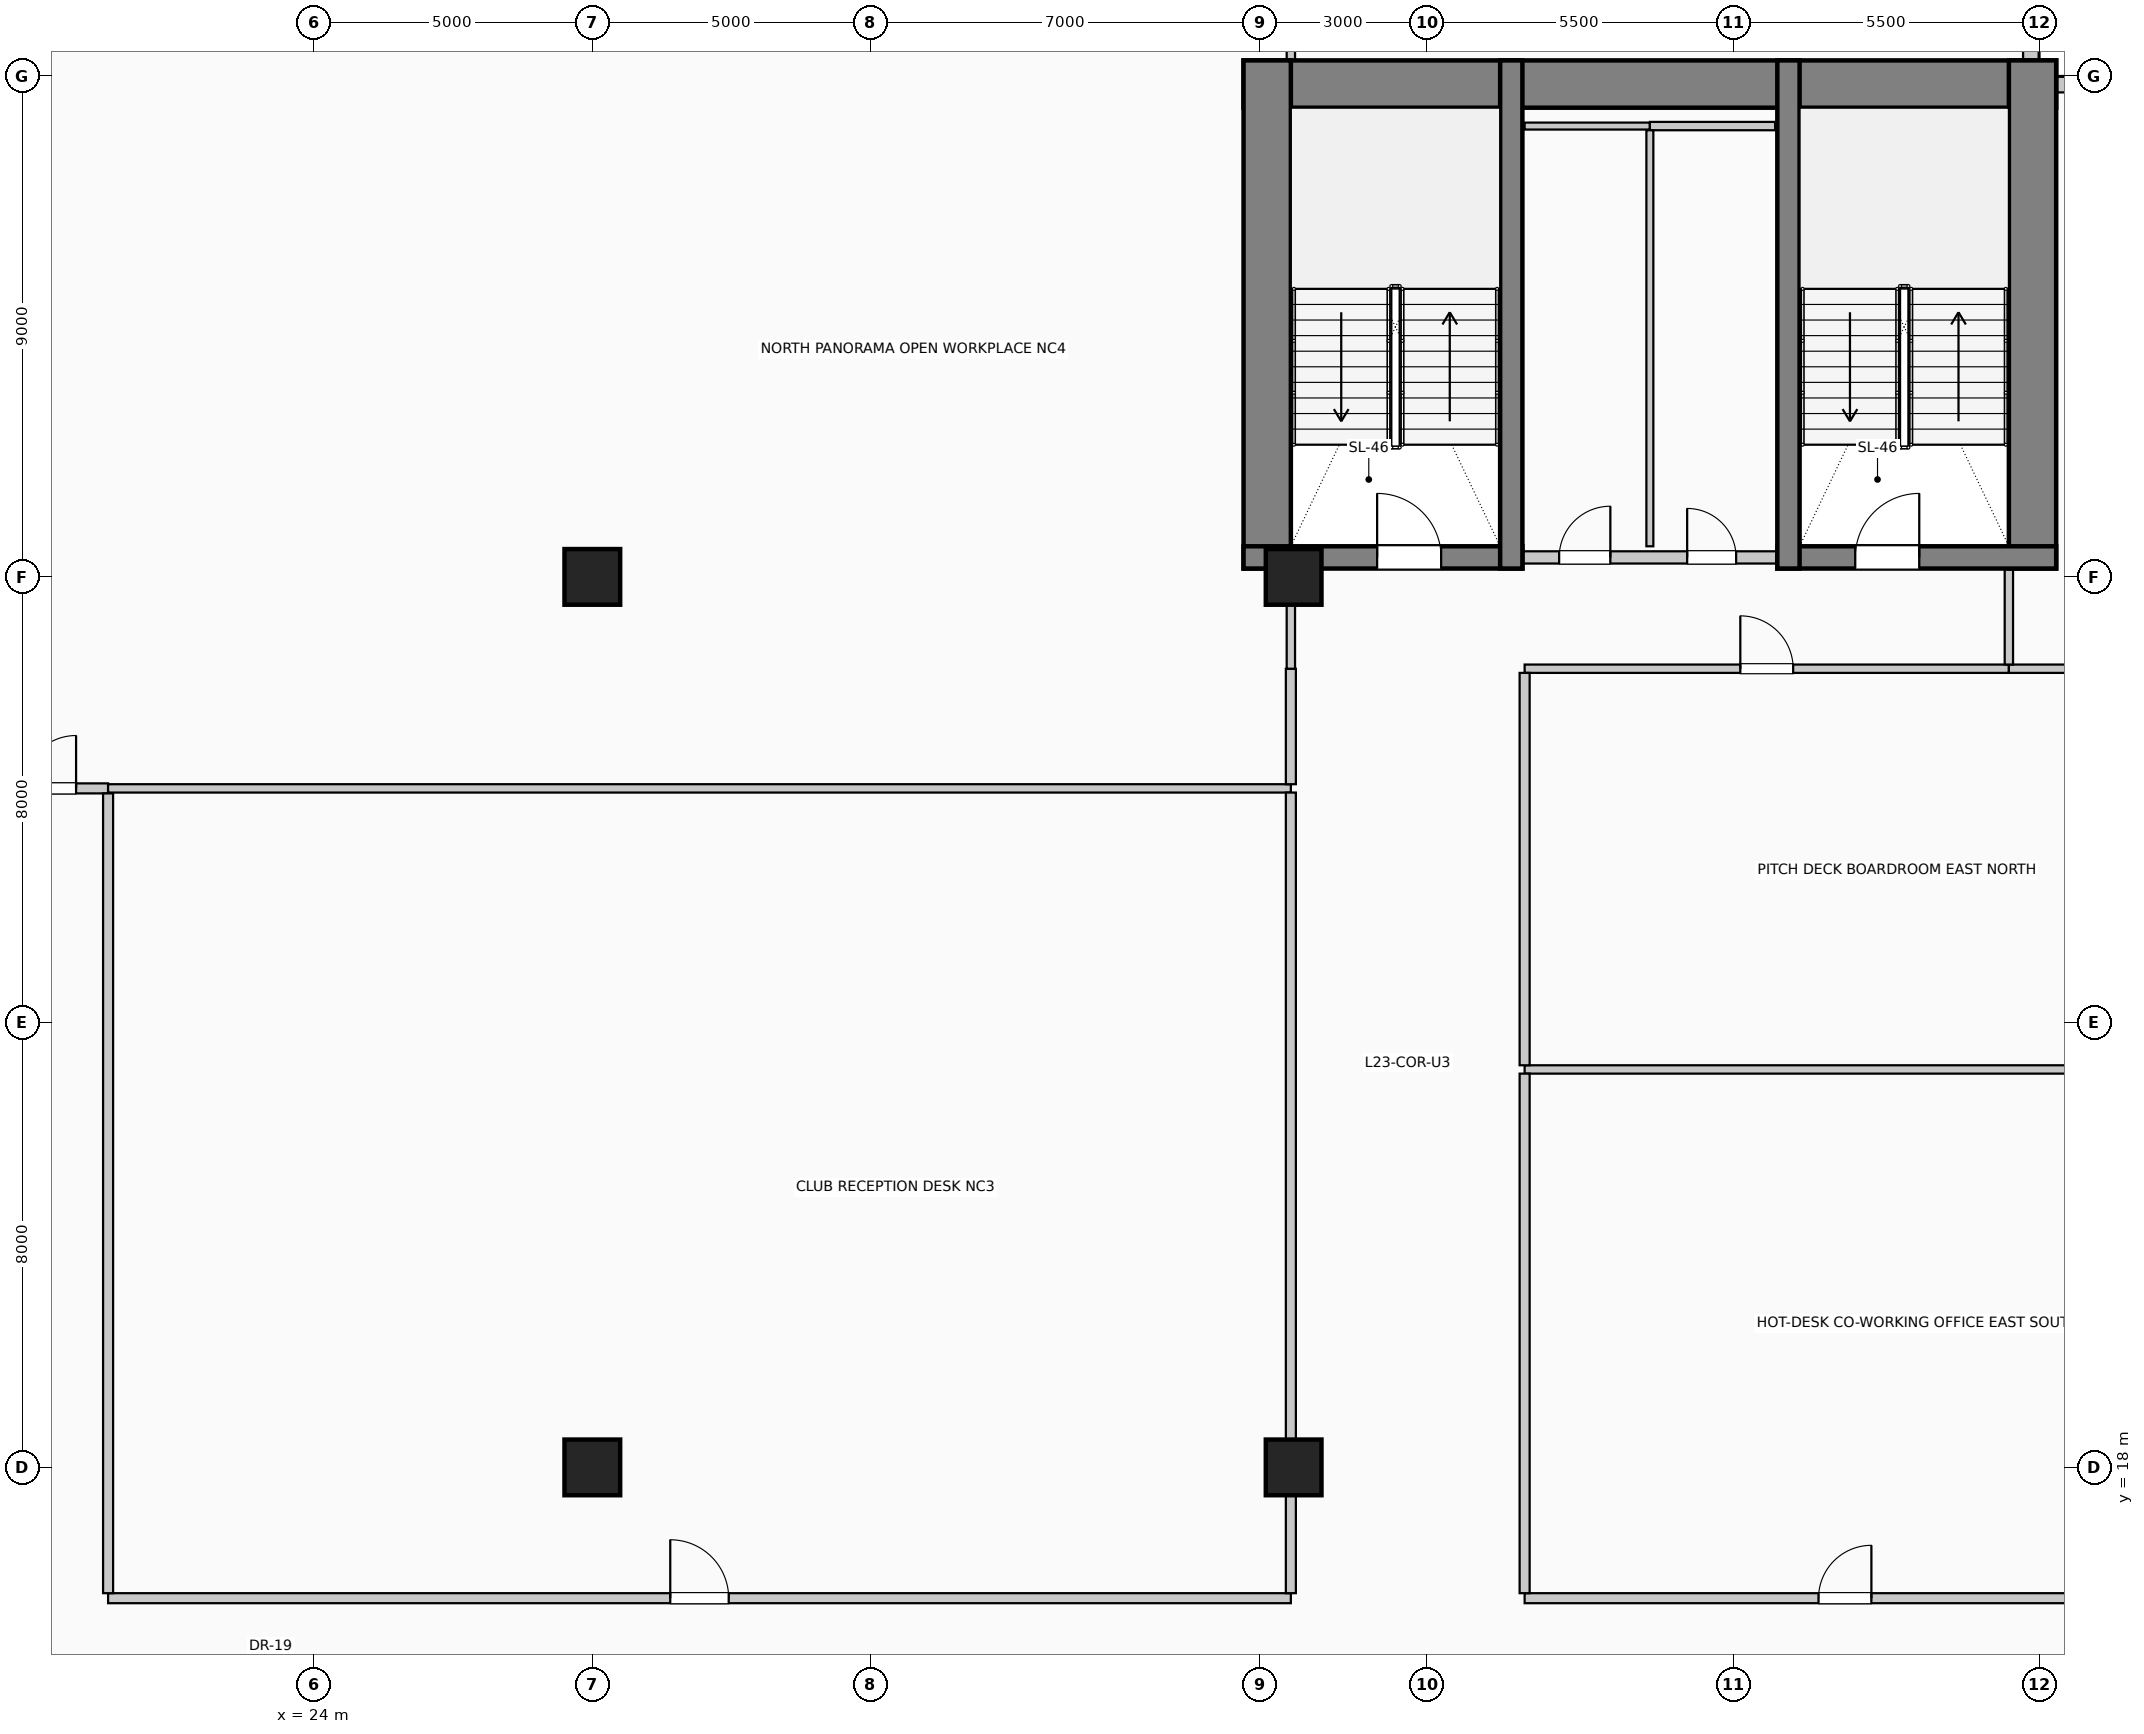
"""IFC4 building model, lengths in metres.
Left out: names, types, materials, properties, quantities, classifications, styles, units other than length and angle.
Written with IfcOpenShell. Run it as: python <this file> out.ifc"""

import sys

from ifc_helpers import new_model, si_unit, direction, frame, frame_2d, origin, origin_2d, place, context, subcontext, project, spatial, rectangle, circle, extrude, element, fill, save


model = new_model("IFC4")
c1 = context("Model", 3, precision=1e-05, world=origin(), true_north=direction((0.0, 1.0)))
c2 = subcontext(c1, "Body", "Model", "MODEL_VIEW")
j1 = project(units=[si_unit("LENGTHUNIT", "METRE"), si_unit("PLANEANGLEUNIT", "RADIAN")], contexts=[c1])
p1 = place(None, origin())
s1 = spatial("IfcSite", under=j1, at=p1, CompositionType="ELEMENT")
p2 = place(p1, origin())
s2 = spatial("IfcBuilding", under=s1, at=p2, CompositionType="ELEMENT")
p3 = place(p2, frame((0.0, 0.0, 96.6)))
s3 = spatial("IfcBuildingStorey", under=s2, at=p3, CompositionType="ELEMENT", Elevation=96.6)
p4 = place(p3, frame((40.7, 42.855, 0.0), z_axis=(0.0, 0.0, 1.0), x_axis=(1.0, 0.0, 0.0)))
e1 = element("IfcWall", 1, at=p4, inside=s3, PredefinedType="SHEAR", context=c2, shape_type="SweptSolid", body=[
    extrude(rectangle(XDim=14.6, YDim=0.85, at=frame_2d((7.3, 0.0))), origin(), (0.0, 0.0, 1.0), 4.0),
])
for number, where, z_axis, x_axis in (
    (2, (41.125, 34.15, 0.0), (0.0, 0.0, 1.0), (0.0, 1.0, 0.0)),
    (3, (54.875, 34.15, 0.0), (0.0, 0.0, 1.0), (0.0, 1.0, 0.0)),
):
    element("IfcWall", number, at=place(p3, frame(where, z_axis=z_axis, x_axis=x_axis)), inside=s3, PredefinedType="SHEAR", context=c2, shape_type="SweptSolid", body=[
        extrude(rectangle(XDim=9.13, YDim=0.85, at=frame_2d((4.565, 0.0))), origin(), (0.0, 0.0, 1.0), 4.0),
    ])
p5 = place(p3, frame((40.7, 34.35, 0.0), z_axis=(0.0, 0.0, 1.0), x_axis=(1.0, 0.0, 0.0)))
e4 = element("IfcWall", 4, at=p5, inside=s3, PredefinedType="SHEAR", context=c2, shape_type="SweptSolid", body=[
    extrude(rectangle(XDim=5.01, YDim=0.4, at=frame_2d((2.505, 0.0))), origin(), (0.0, 0.0, 1.0), 4.0),
])
p6 = place(p5, frame((2.4, 0.0, 0.0)))
e5 = element("IfcOpeningElement", 5, at=p6, cuts=e4, PredefinedType="OPENING", context=c2, shape_type="SweptSolid", body=[
    extrude(rectangle(XDim=1.15, YDim=2.2, at=frame_2d((0.575, 1.1))), frame((0.0, 0.21, 0.0), z_axis=(0.0, -1.0, 0.0), x_axis=(1.0, 0.0, 0.0)), (0.0, 0.0, 1.0), 0.42),
])
p7 = place(p3, frame((45.51, 34.15, 0.0), z_axis=(0.0, 0.0, 1.0), x_axis=(0.0, 1.0, 0.0)))
e6 = element("IfcWall", 6, at=p7, inside=s3, PredefinedType="SHEAR", context=c2, shape_type="SweptSolid", body=[
    extrude(rectangle(XDim=9.13, YDim=0.4, at=frame_2d((4.565, 0.0))), origin(), (0.0, 0.0, 1.0), 4.0),
])
p8 = place(p3, frame((50.29, 34.35, 0.0), z_axis=(0.0, 0.0, 1.0), x_axis=(1.0, 0.0, 0.0)))
e7 = element("IfcWall", 7, at=p8, inside=s3, PredefinedType="SHEAR", context=c2, shape_type="SweptSolid", body=[
    extrude(rectangle(XDim=5.01, YDim=0.4, at=frame_2d((2.505, 0.0))), origin(), (0.0, 0.0, 1.0), 4.0),
])
p9 = place(p8, frame((1.4, 0.0, 0.0)))
e8 = element("IfcOpeningElement", 8, at=p9, cuts=e7, PredefinedType="OPENING", context=c2, shape_type="SweptSolid", body=[
    extrude(rectangle(XDim=1.15, YDim=2.2, at=frame_2d((0.575, 1.1))), frame((0.0, 0.21, 0.0), z_axis=(0.0, -1.0, 0.0), x_axis=(1.0, 0.0, 0.0)), (0.0, 0.0, 1.0), 0.42),
])
p10 = place(p3, frame((50.49, 34.15, 0.0), z_axis=(0.0, 0.0, 1.0), x_axis=(0.0, 1.0, 0.0)))
e9 = element("IfcWall", 9, at=p10, inside=s3, PredefinedType="SHEAR", context=c2, shape_type="SweptSolid", body=[
    extrude(rectangle(XDim=9.13, YDim=0.4, at=frame_2d((4.565, 0.0))), origin(), (0.0, 0.0, 1.0), 4.0),
])
for number, where, z_axis, x_axis in (
    (10, (29.0, 18.0, 0.0), (0.0, 0.0, 1.0), (1.0, 0.0, 0.0)),
    (11, (29.0, 34.0, 0.0), (0.0, 0.0, 1.0), (1.0, 0.0, 0.0)),
    (12, (41.6, 18.0, 0.0), (0.0, 0.0, 1.0), (1.0, 0.0, 0.0)),
    (13, (41.6, 34.0, 0.0), (0.0, 0.0, 1.0), (1.0, 0.0, 0.0)),
):
    element("IfcColumn", number, at=place(p3, frame(where, z_axis=z_axis, x_axis=x_axis)), inside=s3, PredefinedType="COLUMN", context=c2, shape_type="SweptSolid", body=[
        extrude(circle(Radius=0.5, at=origin_2d()), origin(), (0.0, 0.0, 1.0), 4.0),
    ])
p11 = place(p3, frame((54.845, 45.4, 0.0), z_axis=(0.0, 0.0, 1.0), x_axis=(0.0, -1.0, 0.0)))
e14 = element("IfcWall", 14, at=p11, inside=s3, PredefinedType="SOLIDWALL", context=c2, shape_type="SweptSolid", body=[
    extrude(rectangle(XDim=2.115, YDim=0.28, at=frame_2d((1.058, 0.0))), origin(), (0.0, 0.0, 1.0), 3.725),
])
p12 = place(p3, frame((55.305, 42.845, 0.0), z_axis=(0.0, 0.0, 1.0), x_axis=(1.0, 0.0, 0.0)))
e15 = element("IfcWall", 15, at=p12, inside=s3, PredefinedType="SOLIDWALL", context=c2, shape_type="SweptSolid", body=[
    extrude(rectangle(XDim=2.095, YDim=0.28, at=frame_2d((1.047, 0.0))), origin(), (0.0, 0.0, 1.0), 3.725),
])
p13 = place(p3, frame((45.72, 34.35, 0.0), z_axis=(0.0, 0.0, 1.0), x_axis=(1.0, 0.0, 0.0)))
e16 = element("IfcWall", 16, at=p13, inside=s3, PredefinedType="PARTITIONING", context=c2, shape_type="SweptSolid", body=[
    extrude(rectangle(XDim=4.56, YDim=0.22, at=frame_2d((2.28, 0.0))), origin(), (0.0, 0.0, 1.0), 3.725),
])
p14 = place(p13, frame((0.65, 0.0, 0.0)))
e17 = element("IfcOpeningElement", 17, at=p14, cuts=e16, PredefinedType="OPENING", context=c2, shape_type="SweptSolid", body=[
    extrude(rectangle(XDim=0.92, YDim=2.1, at=frame_2d((0.46, 1.05))), frame((0.0, 0.12, 0.0), z_axis=(0.0, -1.0, 0.0), x_axis=(1.0, 0.0, 0.0)), (0.0, 0.0, 1.0), 0.24),
])
p15 = place(p13, frame((2.95, 0.0, 0.0)))
e18 = element("IfcOpeningElement", 18, at=p15, cuts=e16, PredefinedType="OPENING", context=c2, shape_type="SweptSolid", body=[
    extrude(rectangle(XDim=0.88, YDim=2.1, at=frame_2d((0.44, 1.05))), frame((0.0, 0.12, 0.0), z_axis=(0.0, -1.0, 0.0), x_axis=(1.0, 0.0, 0.0)), (0.0, 0.0, 1.0), 0.24),
])
p16 = place(p3, frame((20.3, 15.65, 0.0), z_axis=(0.0, 0.0, 1.0), x_axis=(1.0, 0.0, 0.0)))
e19 = element("IfcWall", 19, at=p16, inside=s3, PredefinedType="PARTITIONING", context=c2, shape_type="SweptSolid", body=[
    extrude(rectangle(XDim=21.25, YDim=0.18, at=frame_2d((10.625, 0.0))), origin(), (0.0, 0.0, 1.0), 3.725),
])
p17 = place(p16, frame((10.1, 0.0, 0.0)))
e20 = element("IfcOpeningElement", 20, at=p17, cuts=e19, PredefinedType="OPENING", context=c2, shape_type="SweptSolid", body=[
    extrude(rectangle(XDim=1.05, YDim=2.15, at=frame_2d((0.525, 1.075))), frame((0.0, 0.1, 0.0), z_axis=(0.0, -1.0, 0.0), x_axis=(1.0, 0.0, 0.0)), (0.0, 0.0, 1.0), 0.2),
])
p18 = place(p3, frame((45.75, 15.65, 0.0), z_axis=(0.0, 0.0, 1.0), x_axis=(1.0, 0.0, 0.0)))
e21 = element("IfcWall", 21, at=p18, inside=s3, PredefinedType="PARTITIONING", context=c2, shape_type="SweptSolid", body=[
    extrude(rectangle(XDim=11.51, YDim=0.18, at=frame_2d((5.755, 0.0))), origin(), (0.0, 0.0, 1.0), 3.725),
])
p19 = place(p18, frame((5.28, 0.0, 0.0)))
e22 = element("IfcOpeningElement", 22, at=p19, cuts=e21, PredefinedType="OPENING", context=c2, shape_type="SweptSolid", body=[
    extrude(rectangle(XDim=0.95, YDim=2.15, at=frame_2d((0.475, 1.075))), frame((0.0, 0.1, 0.0), z_axis=(0.0, -1.0, 0.0), x_axis=(1.0, 0.0, 0.0)), (0.0, 0.0, 1.0), 0.2),
])
p20 = place(p3, frame((45.75, 25.15, 0.0), z_axis=(0.0, 0.0, 1.0), x_axis=(1.0, 0.0, 0.0)))
e23 = element("IfcWall", 23, at=p20, inside=s3, PredefinedType="PARTITIONING", context=c2, shape_type="SweptSolid", body=[
    extrude(rectangle(XDim=11.51, YDim=0.15, at=frame_2d((5.755, 0.0))), origin(), (0.0, 0.0, 1.0), 3.17),
])
p21 = place(p3, frame((18.2, 30.2, 0.0), z_axis=(0.0, 0.0, 1.0), x_axis=(1.0, 0.0, 0.0)))
e24 = element("IfcWall", 24, at=p21, inside=s3, PredefinedType="PARTITIONING", context=c2, shape_type="SweptSolid", body=[
    extrude(rectangle(XDim=2.1, YDim=0.18, at=frame_2d((1.05, 0.0))), origin(), (0.0, 0.0, 1.0), 3.725),
])
p22 = place(p21, frame((0.575, 0.0, 0.0)))
e25 = element("IfcOpeningElement", 25, at=p22, cuts=e24, PredefinedType="OPENING", context=c2, shape_type="SweptSolid", body=[
    extrude(rectangle(XDim=0.95, YDim=2.15, at=frame_2d((0.475, 1.075))), frame((0.0, 0.1, 0.0), z_axis=(0.0, -1.0, 0.0), x_axis=(1.0, 0.0, 0.0)), (0.0, 0.0, 1.0), 0.2),
])
p23 = place(p3, frame((20.3, 30.2, 0.0), z_axis=(0.0, 0.0, 1.0), x_axis=(1.0, 0.0, 0.0)))
e26 = element("IfcWall", 26, at=p23, inside=s3, PredefinedType="PARTITIONING", context=c2, shape_type="SweptSolid", body=[
    extrude(rectangle(XDim=21.25, YDim=0.15, at=frame_2d((10.625, 0.0))), origin(), (0.0, 0.0, 1.0), 3.725),
])
p24 = place(p3, frame((45.75, 32.35, 0.0), z_axis=(0.0, 0.0, 1.0), x_axis=(1.0, 0.0, 0.0)))
e27 = element("IfcWall", 27, at=p24, inside=s3, PredefinedType="PARTITIONING", context=c2, shape_type="SweptSolid", body=[
    extrude(rectangle(XDim=8.7, YDim=0.15, at=frame_2d((4.35, 0.0))), origin(), (0.0, 0.0, 1.0), 3.725),
])
p25 = place(p24, frame((3.875, 0.0, 0.0)))
e28 = element("IfcOpeningElement", 28, at=p25, cuts=e27, PredefinedType="OPENING", context=c2, shape_type="SweptSolid", body=[
    extrude(rectangle(XDim=0.95, YDim=2.15, at=frame_2d((0.475, 1.075))), frame((0.0, 0.085, 0.0), z_axis=(0.0, -1.0, 0.0), x_axis=(1.0, 0.0, 0.0)), (0.0, 0.0, 1.0), 0.17),
])
p26 = place(p3, frame((54.45, 32.35, 0.0), z_axis=(0.0, 0.0, 1.0), x_axis=(1.0, 0.0, 0.0)))
e29 = element("IfcWall", 29, at=p26, inside=s3, PredefinedType="PARTITIONING", context=c2, shape_type="SweptSolid", body=[
    extrude(rectangle(XDim=2.81, YDim=0.15, at=frame_2d((1.405, 0.0))), origin(), (0.0, 0.0, 1.0), 3.725),
])
p27 = place(p3, frame((45.75, 42.1, 0.0), z_axis=(0.0, 0.0, 1.0), x_axis=(1.0, 0.0, 0.0)))
e30 = element("IfcWall", 30, at=p27, inside=s3, PredefinedType="PARTITIONING", context=c2, shape_type="SweptSolid", body=[
    extrude(rectangle(XDim=2.25, YDim=0.125, at=frame_2d((1.125, 0.0))), origin(), (0.0, 0.0, 1.0), 3.725),
])
p28 = place(p3, frame((48.0, 42.1, 0.0), z_axis=(0.0, 0.0, 1.0), x_axis=(1.0, 0.0, 0.0)))
e31 = element("IfcWall", 31, at=p28, inside=s3, PredefinedType="PARTITIONING", context=c2, shape_type="SweptSolid", body=[
    extrude(rectangle(XDim=2.25, YDim=0.15, at=frame_2d((1.125, 0.0))), origin(), (0.0, 0.0, 1.0), 3.725),
])
p29 = place(p3, frame((20.3, 15.74, 0.0), z_axis=(0.0, 0.0, 1.0), x_axis=(0.0, 1.0, 0.0)))
e32 = element("IfcWall", 32, at=p29, inside=s3, PredefinedType="PARTITIONING", context=c2, shape_type="SweptSolid", body=[
    extrude(rectangle(XDim=14.37, YDim=0.18, at=frame_2d((7.185, 0.0))), origin(), (0.0, 0.0, 1.0), 3.725),
])
p30 = place(p3, frame((41.55, 15.74, 0.0), z_axis=(0.0, 0.0, 1.0), x_axis=(0.0, 1.0, 0.0)))
e33 = element("IfcWall", 33, at=p30, inside=s3, PredefinedType="PARTITIONING", context=c2, shape_type="SweptSolid", body=[
    extrude(rectangle(XDim=1.76, YDim=0.18, at=frame_2d((0.88, 0.0))), origin(), (0.0, 0.0, 1.0), 3.07),
])
p31 = place(p3, frame((41.55, 18.5, 0.0), z_axis=(0.0, 0.0, 1.0), x_axis=(0.0, 1.0, 0.0)))
e34 = element("IfcWall", 34, at=p31, inside=s3, PredefinedType="PARTITIONING", context=c2, shape_type="SweptSolid", body=[
    extrude(rectangle(XDim=11.625, YDim=0.18, at=frame_2d((5.812, 0.0))), origin(), (0.0, 0.0, 1.0), 3.07),
])
p32 = place(p3, frame((41.55, 30.275, 0.0), z_axis=(0.0, 0.0, 1.0), x_axis=(0.0, 1.0, 0.0)))
e35 = element("IfcWall", 35, at=p32, inside=s3, PredefinedType="PARTITIONING", context=c2, shape_type="SweptSolid", body=[
    extrude(rectangle(XDim=2.075, YDim=0.18, at=frame_2d((1.038, 0.0))), origin(), (0.0, 0.0, 1.0), 3.07),
])
p33 = place(p3, frame((41.55, 32.35, 0.0), z_axis=(0.0, 0.0, 1.0), x_axis=(0.0, 1.0, 0.0)))
e36 = element("IfcWall", 36, at=p33, inside=s3, PredefinedType="PARTITIONING", context=c2, shape_type="SweptSolid", body=[
    extrude(rectangle(XDim=1.15, YDim=0.15, at=frame_2d((0.575, 0.0))), origin(), (0.0, 0.0, 1.0), 3.07),
])
p34 = place(p3, frame((41.55, 43.28, 0.0), z_axis=(0.0, 0.0, 1.0), x_axis=(0.0, 1.0, 0.0)))
e37 = element("IfcWall", 37, at=p34, inside=s3, PredefinedType="PARTITIONING", context=c2, shape_type="SweptSolid", body=[
    extrude(rectangle(XDim=1.42, YDim=0.15, at=frame_2d((0.71, 0.0))), origin(), (0.0, 0.0, 1.0), 3.725),
])
p35 = place(p3, frame((45.75, 15.74, 0.0), z_axis=(0.0, 0.0, 1.0), x_axis=(0.0, 1.0, 0.0)))
e38 = element("IfcWall", 38, at=p35, inside=s3, PredefinedType="PARTITIONING", context=c2, shape_type="SweptSolid", body=[
    extrude(rectangle(XDim=9.335, YDim=0.18, at=frame_2d((4.667, 0.0))), origin(), (0.0, 0.0, 1.0), 3.725),
])
p36 = place(p3, frame((45.75, 25.225, 0.0), z_axis=(0.0, 0.0, 1.0), x_axis=(0.0, 1.0, 0.0)))
e39 = element("IfcWall", 39, at=p36, inside=s3, PredefinedType="PARTITIONING", context=c2, shape_type="SweptSolid", body=[
    extrude(rectangle(XDim=7.05, YDim=0.18, at=frame_2d((3.525, 0.0))), origin(), (0.0, 0.0, 1.0), 3.725),
])
p37 = place(p3, frame((48.0, 34.55, 0.0), z_axis=(0.0, 0.0, 1.0), x_axis=(0.0, 1.0, 0.0)))
e40 = element("IfcWall", 40, at=p37, inside=s3, PredefinedType="PARTITIONING", context=c2, shape_type="SweptSolid", body=[
    extrude(rectangle(XDim=7.475, YDim=0.125, at=frame_2d((3.737, 0.0))), origin(), (0.0, 0.0, 1.0), 3.725),
])
p38 = place(p3, frame((54.45, 32.425, 0.0), z_axis=(0.0, 0.0, 1.0), x_axis=(0.0, 1.0, 0.0)))
e41 = element("IfcWall", 41, at=p38, inside=s3, PredefinedType="PARTITIONING", context=c2, shape_type="SweptSolid", body=[
    extrude(rectangle(XDim=1.725, YDim=0.15, at=frame_2d((0.862, 0.0))), origin(), (0.0, 0.0, 1.0), 3.725),
])
p39 = place(p6, origin())
e42 = element("IfcDoor", 42, at=p39, inside=s3, OperationType="SINGLE_SWING_LEFT", PredefinedType="DOOR", context=c2, shape_type="SweptSolid", body=[
    extrude(rectangle(XDim=1.15, YDim=2.2, at=frame_2d((0.575, 1.1))), frame((0.0, 0.025, 0.0), z_axis=(0.0, -1.0, 0.0), x_axis=(1.0, 0.0, 0.0)), (0.0, 0.0, 1.0), 0.05),
])
fill(e5, e42)
p40 = place(p14, origin())
e43 = element("IfcDoor", 43, at=p40, inside=s3, OperationType="SINGLE_SWING_RIGHT", PredefinedType="DOOR", context=c2, shape_type="SweptSolid", body=[
    extrude(rectangle(XDim=0.92, YDim=2.1, at=frame_2d((0.46, 1.05))), frame((0.0, 0.025, 0.0), z_axis=(0.0, -1.0, 0.0), x_axis=(1.0, 0.0, 0.0)), (0.0, 0.0, 1.0), 0.05),
])
fill(e17, e43)
p41 = place(p15, origin())
e44 = element("IfcDoor", 44, at=p41, inside=s3, OperationType="SINGLE_SWING_LEFT", PredefinedType="DOOR", context=c2, shape_type="SweptSolid", body=[
    extrude(rectangle(XDim=0.88, YDim=2.1, at=frame_2d((0.44, 1.05))), frame((0.0, 0.025, 0.0), z_axis=(0.0, -1.0, 0.0), x_axis=(1.0, 0.0, 0.0)), (0.0, 0.0, 1.0), 0.05),
])
fill(e18, e44)
p42 = place(p9, origin())
e45 = element("IfcDoor", 45, at=p42, inside=s3, OperationType="SINGLE_SWING_RIGHT", PredefinedType="DOOR", context=c2, shape_type="SweptSolid", body=[
    extrude(rectangle(XDim=1.15, YDim=2.2, at=frame_2d((0.575, 1.1))), frame((0.0, 0.025, 0.0), z_axis=(0.0, -1.0, 0.0), x_axis=(1.0, 0.0, 0.0)), (0.0, 0.0, 1.0), 0.05),
])
fill(e8, e45)
p43 = place(p17, origin())
e46 = element("IfcDoor", 46, at=p43, inside=s3, OperationType="SINGLE_SWING_LEFT", PredefinedType="DOOR", context=c2, shape_type="SweptSolid", body=[
    extrude(rectangle(XDim=1.05, YDim=2.15, at=frame_2d((0.525, 1.075))), frame((0.0, 0.025, 0.0), z_axis=(0.0, -1.0, 0.0), x_axis=(1.0, 0.0, 0.0)), (0.0, 0.0, 1.0), 0.05),
])
fill(e20, e46)
p44 = place(p19, origin())
e47 = element("IfcDoor", 47, at=p44, inside=s3, OperationType="SINGLE_SWING_RIGHT", PredefinedType="DOOR", context=c2, shape_type="SweptSolid", body=[
    extrude(rectangle(XDim=0.95, YDim=2.15, at=frame_2d((0.475, 1.075))), frame((0.0, 0.025, 0.0), z_axis=(0.0, -1.0, 0.0), x_axis=(1.0, 0.0, 0.0)), (0.0, 0.0, 1.0), 0.05),
])
fill(e22, e47)
p45 = place(p22, origin())
e48 = element("IfcDoor", 48, at=p45, inside=s3, OperationType="SINGLE_SWING_RIGHT", PredefinedType="DOOR", context=c2, shape_type="SweptSolid", body=[
    extrude(rectangle(XDim=0.95, YDim=2.15, at=frame_2d((0.475, 1.075))), frame((0.0, 0.025, 0.0), z_axis=(0.0, -1.0, 0.0), x_axis=(1.0, 0.0, 0.0)), (0.0, 0.0, 1.0), 0.05),
])
fill(e25, e48)
p46 = place(p25, origin())
e49 = element("IfcDoor", 49, at=p46, inside=s3, OperationType="SINGLE_SWING_LEFT", PredefinedType="DOOR", context=c2, shape_type="SweptSolid", body=[
    extrude(rectangle(XDim=0.95, YDim=2.15, at=frame_2d((0.475, 1.075))), frame((0.0, 0.025, 0.0), z_axis=(0.0, -1.0, 0.0), x_axis=(1.0, 0.0, 0.0)), (0.0, 0.0, 1.0), 0.05),
])
fill(e28, e49)
save(model, sys.argv[1])
